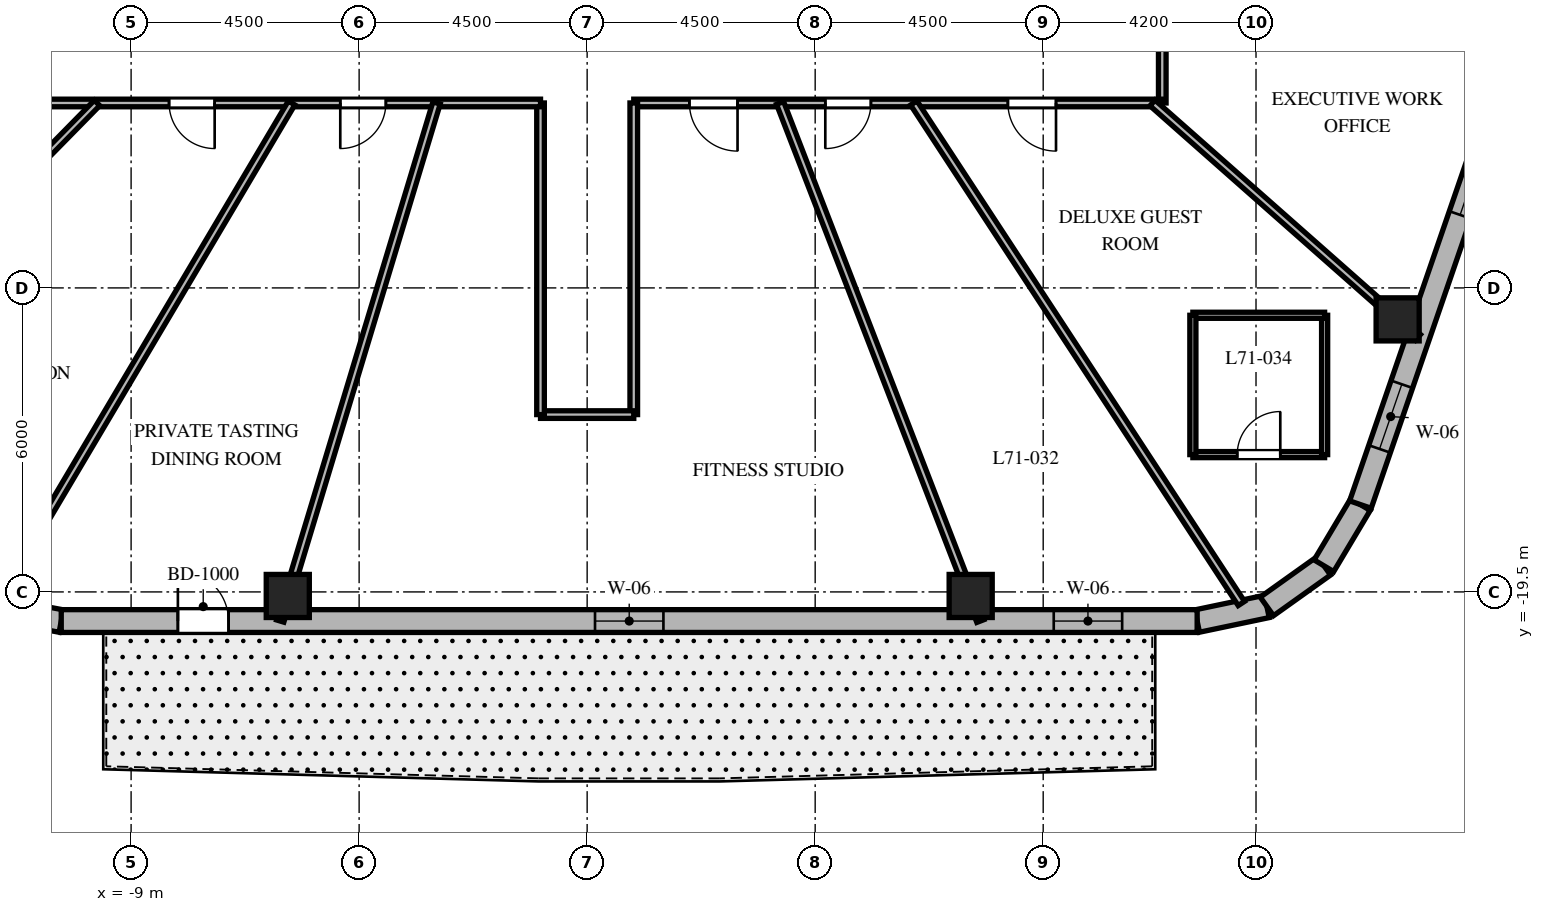
"""IFC4 building model, lengths in metres.
Left out: names, types, materials, properties, quantities, classifications, styles, units other than length and angle.
Written with IfcOpenShell. Run it as: python <this file> out.ifc"""

import sys

from ifc_helpers import new_model, si_unit, direction, frame, frame_2d, origin, origin_2d, place, context, subcontext, project, spatial, rectangle, extrude, element, fill, save


model = new_model("IFC4")
c1 = context("Model", 3, precision=1e-05, world=origin(), true_north=direction((0.0, 1.0)))
c2 = subcontext(c1, "Body", "Model", "MODEL_VIEW")
j1 = project(units=[si_unit("LENGTHUNIT", "METRE"), si_unit("PLANEANGLEUNIT", "RADIAN")], contexts=[c1])
p1 = place(None, origin())
s1 = spatial("IfcSite", under=j1, at=p1, CompositionType="ELEMENT")
p2 = place(p1, origin())
s2 = spatial("IfcBuilding", under=s1, at=p2, CompositionType="ELEMENT")
p3 = place(p2, frame((0.0, 0.0, 284.7)))
s3 = spatial("IfcBuildingStorey", under=s2, at=p3, CompositionType="ELEMENT", Elevation=284.7)
for number, where, z_axis, x_axis in (
    (1, (-5.908, -19.58, 0.0), (0.0, 0.0, 1.0), (1.0, 0.0, 0.0)),
    (2, (7.569, -19.58, 0.0), (0.0, 0.0, 1.0), (1.0, 0.0, 0.0)),
    (3, (15.995, -14.121, 0.0), (0.0, 0.0, 1.0), (1.0, 0.0, 0.0)),
):
    element("IfcColumn", number, at=place(p3, frame(where, z_axis=z_axis, x_axis=x_axis)), inside=s3, PredefinedType="COLUMN", context=c2, shape_type="SweptSolid", body=[
        extrude(rectangle(XDim=0.85, YDim=0.85, at=origin_2d()), origin(), (0.0, 0.0, 1.0), 3.9),
    ])
p4 = place(p3, frame((-11.626, -19.84, 0.0), z_axis=(0.0, 0.0, 1.0), x_axis=(0.982701956681, -0.185194126083, 0.0)))
e4 = element("IfcWall", 4, at=p4, inside=s3, PredefinedType="SOLIDWALL", context=c2, shape_type="SweptSolid", body=[
    extrude(rectangle(XDim=1.27, YDim=0.45, at=frame_2d((0.635, 0.0))), origin(), (0.0, 0.0, 1.0), 3.58),
])
p5 = place(p3, frame((12.038, -20.075, 0.0), z_axis=(0.0, 0.0, 1.0), x_axis=(0.978750122553, 0.205056571711, 0.0)))
e5 = element("IfcWall", 5, at=p5, inside=s3, PredefinedType="SOLIDWALL", context=c2, shape_type="SweptSolid", body=[
    extrude(rectangle(XDim=1.406, YDim=0.45, at=frame_2d((0.703, 0.0))), origin(), (0.0, 0.0, 1.0), 3.58),
])
p6 = place(p3, frame((13.415, -19.787, 0.0), z_axis=(0.0, 0.0, 1.0), x_axis=(0.814055493997, 0.580787097561, 0.0)))
e6 = element("IfcWall", 6, at=p6, inside=s3, PredefinedType="SOLIDWALL", context=c2, shape_type="SweptSolid", body=[
    extrude(rectangle(XDim=1.383, YDim=0.45, at=frame_2d((0.691, 0.0))), origin(), (0.0, 0.0, 1.0), 3.58),
])
p7 = place(p3, frame((14.54, -18.984, 0.0), z_axis=(0.0, 0.0, 1.0), x_axis=(0.512374906623, 0.858761873317, 0.0)))
e7 = element("IfcWall", 7, at=p7, inside=s3, PredefinedType="SOLIDWALL", context=c2, shape_type="SweptSolid", body=[
    extrude(rectangle(XDim=1.406, YDim=0.45, at=frame_2d((0.703, 0.0))), origin(), (0.0, 0.0, 1.0), 3.58),
])
p8 = place(p3, frame((-10.379, -20.075, 0.0), z_axis=(0.0, 0.0, 1.0), x_axis=(1.0, 0.0, 0.0)))
e8 = element("IfcWall", 8, at=p8, inside=s3, PredefinedType="SOLIDWALL", context=c2, shape_type="SweptSolid", body=[
    extrude(rectangle(XDim=22.417, YDim=0.45, at=frame_2d((11.208, 0.0))), origin(), (0.0, 0.0, 1.0), 3.58),
])
p9 = place(p8, frame((2.302, 0.0, 0.0)))
e9 = element("IfcOpeningElement", 9, at=p9, cuts=e8, PredefinedType="OPENING", context=c2, shape_type="SweptSolid", body=[
    extrude(rectangle(XDim=1.0, YDim=2.15, at=frame_2d((0.5, 1.075))), frame((0.0, 0.235, 0.0), z_axis=(0.0, -1.0, 0.0), x_axis=(1.0, 0.0, 0.0)), (0.0, 0.0, 1.0), 0.47),
])
p10 = place(p8, frame((10.534, 0.0, 0.8)))
e10 = element("IfcOpeningElement", 10, at=p10, cuts=e8, PredefinedType="OPENING", context=c2, shape_type="SweptSolid", body=[
    extrude(rectangle(XDim=1.35, YDim=1.75, at=frame_2d((0.675, 0.875))), frame((0.0, 0.235, 0.0), z_axis=(0.0, -1.0, 0.0), x_axis=(1.0, 0.0, 0.0)), (0.0, 0.0, 1.0), 0.47),
])
p11 = place(p8, frame((19.587, 0.0, 0.8)))
e11 = element("IfcOpeningElement", 11, at=p11, cuts=e8, PredefinedType="OPENING", context=c2, shape_type="SweptSolid", body=[
    extrude(rectangle(XDim=1.35, YDim=1.75, at=frame_2d((0.675, 0.875))), frame((0.0, 0.235, 0.0), z_axis=(0.0, -1.0, 0.0), x_axis=(1.0, 0.0, 0.0)), (0.0, 0.0, 1.0), 0.47),
])
p12 = place(p3, frame((15.26, -17.776, 0.0), z_axis=(0.0, 0.0, 1.0), x_axis=(0.325407437101, 0.945573899745, 0.0)))
e12 = element("IfcWall", 12, at=p12, inside=s3, PredefinedType="SOLIDWALL", context=c2, shape_type="SweptSolid", body=[
    extrude(rectangle(XDim=18.552, YDim=0.45, at=frame_2d((9.276, 0.0))), origin(), (0.0, 0.0, 1.0), 3.58),
])
p13 = place(p12, frame((1.161, 0.0, 0.8)))
e13 = element("IfcOpeningElement", 13, at=p13, cuts=e12, PredefinedType="OPENING", context=c2, shape_type="SweptSolid", body=[
    extrude(rectangle(XDim=1.35, YDim=1.75, at=frame_2d((0.675, 0.875))), frame((0.0, 0.235, 0.0), z_axis=(0.0, -1.0, 0.0), x_axis=(1.0, 0.0, 0.0)), (0.0, 0.0, 1.0), 0.47),
])
p14 = place(p12, frame((6.046, 0.0, 0.8)))
e14 = element("IfcOpeningElement", 14, at=p14, cuts=e12, PredefinedType="OPENING", context=c2, shape_type="SweptSolid", body=[
    extrude(rectangle(XDim=1.35, YDim=1.75, at=frame_2d((0.675, 0.875))), frame((0.0, 0.235, 0.0), z_axis=(0.0, -1.0, 0.0), x_axis=(1.0, 0.0, 0.0)), (0.0, 0.0, 1.0), 0.47),
])
p15 = place(p12, frame((11.228, 0.0, 0.8)))
e15 = element("IfcOpeningElement", 15, at=p15, cuts=e12, PredefinedType="OPENING", context=c2, shape_type="SweptSolid", body=[
    extrude(rectangle(XDim=1.35, YDim=1.75, at=frame_2d((0.675, 0.875))), frame((0.0, 0.235, 0.0), z_axis=(0.0, -1.0, 0.0), x_axis=(1.0, 0.0, 0.0)), (0.0, 0.0, 1.0), 0.47),
])
p16 = place(p12, frame((15.987, 0.0, 0.8)))
e16 = element("IfcOpeningElement", 16, at=p16, cuts=e12, PredefinedType="OPENING", context=c2, shape_type="SweptSolid", body=[
    extrude(rectangle(XDim=1.35, YDim=1.75, at=frame_2d((0.675, 0.875))), frame((0.0, 0.235, 0.0), z_axis=(0.0, -1.0, 0.0), x_axis=(1.0, 0.0, 0.0)), (0.0, 0.0, 1.0), 0.47),
])
p17 = place(p3, frame((11.35, -4.4, 0.0), z_axis=(0.0, 0.0, 1.0), x_axis=(0.0, -1.0, 0.0)))
e17 = element("IfcWall", 17, at=p17, inside=s3, PredefinedType="PARTITIONING", context=c2, shape_type="SweptSolid", body=[
    extrude(rectangle(XDim=5.45, YDim=0.15, at=frame_2d((2.725, 0.0))), origin(), (0.0, 0.0, 1.0), 3.07),
])
p18 = place(p17, frame((2.708, 0.0, 0.0)))
e18 = element("IfcOpeningElement", 18, at=p18, cuts=e17, PredefinedType="OPENING", context=c2, shape_type="SweptSolid", body=[
    extrude(rectangle(XDim=0.9, YDim=2.03, at=frame_2d((0.45, 1.015))), frame((0.0, 0.085, 0.0), z_axis=(0.0, -1.0, 0.0), x_axis=(1.0, 0.0, 0.0)), (0.0, 0.0, 1.0), 0.17),
])
p19 = place(p3, frame((11.35, -9.85, 0.0), z_axis=(0.0, 0.0, 1.0), x_axis=(-1.0, 0.0, 0.0)))
e19 = element("IfcWall", 19, at=p19, inside=s3, PredefinedType="PARTITIONING", context=c2, shape_type="SweptSolid", body=[
    extrude(rectangle(XDim=10.43, YDim=0.15, at=frame_2d((5.215, 0.0))), origin(), (0.0, 0.0, 1.0), 3.07),
])
p20 = place(p19, frame((8.382, 0.0, 0.0)))
e20 = element("IfcOpeningElement", 20, at=p20, cuts=e19, PredefinedType="OPENING", context=c2, shape_type="SweptSolid", body=[
    extrude(rectangle(XDim=0.95, YDim=2.03, at=frame_2d((0.475, 1.015))), frame((0.0, 0.085, 0.0), z_axis=(0.0, -1.0, 0.0), x_axis=(1.0, 0.0, 0.0)), (0.0, 0.0, 1.0), 0.17),
])
p21 = place(p19, frame((5.75, 0.0, 0.0)))
e21 = element("IfcOpeningElement", 21, at=p21, cuts=e19, PredefinedType="OPENING", context=c2, shape_type="SweptSolid", body=[
    extrude(rectangle(XDim=0.9, YDim=2.03, at=frame_2d((0.45, 1.015))), frame((0.0, 0.085, 0.0), z_axis=(0.0, -1.0, 0.0), x_axis=(1.0, 0.0, 0.0)), (0.0, 0.0, 1.0), 0.17),
])
p22 = place(p19, frame((2.097, 0.0, 0.0)))
e22 = element("IfcOpeningElement", 22, at=p22, cuts=e19, PredefinedType="OPENING", context=c2, shape_type="SweptSolid", body=[
    extrude(rectangle(XDim=0.95, YDim=2.03, at=frame_2d((0.475, 1.015))), frame((0.0, 0.085, 0.0), z_axis=(0.0, -1.0, 0.0), x_axis=(1.0, 0.0, 0.0)), (0.0, 0.0, 1.0), 0.17),
])
p23 = place(p3, frame((0.92, -9.85, 0.0), z_axis=(0.0, 0.0, 1.0), x_axis=(0.0, -1.0, 0.0)))
e23 = element("IfcWall", 23, at=p23, inside=s3, PredefinedType="PARTITIONING", context=c2, shape_type="SweptSolid", body=[
    extrude(rectangle(XDim=6.15, YDim=0.15, at=frame_2d((3.075, 0.0))), origin(), (0.0, 0.0, 1.0), 3.021),
])
p24 = place(p3, frame((0.92, -16.0, 0.0), z_axis=(0.0, 0.0, 1.0), x_axis=(-1.0, 0.0, 0.0)))
e24 = element("IfcWall", 24, at=p24, inside=s3, PredefinedType="PARTITIONING", context=c2, shape_type="SweptSolid", body=[
    extrude(rectangle(XDim=1.84, YDim=0.15, at=frame_2d((0.92, 0.0))), origin(), (0.0, 0.0, 1.0), 3.58),
])
p25 = place(p3, frame((-0.92, -16.0, 0.0), z_axis=(0.0, 0.0, 1.0), x_axis=(0.0, 1.0, 0.0)))
e25 = element("IfcWall", 25, at=p25, inside=s3, PredefinedType="PARTITIONING", context=c2, shape_type="SweptSolid", body=[
    extrude(rectangle(XDim=6.15, YDim=0.15, at=frame_2d((3.075, 0.0))), origin(), (0.0, 0.0, 1.0), 3.021),
])
p26 = place(p3, frame((-0.92, -9.85, 0.0), z_axis=(0.0, 0.0, 1.0), x_axis=(-1.0, 0.0, 0.0)))
e26 = element("IfcWall", 26, at=p26, inside=s3, PredefinedType="PARTITIONING", context=c2, shape_type="SweptSolid", body=[
    extrude(rectangle(XDim=10.43, YDim=0.15, at=frame_2d((5.215, 0.0))), origin(), (0.0, 0.0, 1.0), 3.07),
])
p27 = place(p26, frame((6.431, 0.0, 0.0)))
e27 = element("IfcOpeningElement", 27, at=p27, cuts=e26, PredefinedType="OPENING", context=c2, shape_type="SweptSolid", body=[
    extrude(rectangle(XDim=0.9, YDim=2.03, at=frame_2d((0.45, 1.015))), frame((0.0, 0.085, 0.0), z_axis=(0.0, -1.0, 0.0), x_axis=(1.0, 0.0, 0.0)), (0.0, 0.0, 1.0), 0.17),
])
p28 = place(p26, frame((3.052, 0.0, 0.0)))
e28 = element("IfcOpeningElement", 28, at=p28, cuts=e26, PredefinedType="OPENING", context=c2, shape_type="SweptSolid", body=[
    extrude(rectangle(XDim=0.9, YDim=2.03, at=frame_2d((0.45, 1.015))), frame((0.0, 0.085, 0.0), z_axis=(0.0, -1.0, 0.0), x_axis=(1.0, 0.0, 0.0)), (0.0, 0.0, 1.0), 0.17),
])
p29 = place(p3, frame((-9.672, -9.85, 0.0), z_axis=(0.0, 0.0, 1.0), x_axis=(-0.700629771301, -0.713524998558, 0.0)))
e29 = element("IfcWall", 29, at=p29, inside=s3, PredefinedType="PARTITIONING", context=c2, shape_type="SweptSolid", body=[
    extrude(rectangle(XDim=7.459, YDim=0.15, at=frame_2d((3.73, 0.0))), origin(), (0.0, 0.0, 1.0), 2.92),
])
p30 = place(p3, frame((-5.833, -9.85, 0.0), z_axis=(0.0, 0.0, 1.0), x_axis=(-0.509561365941, -0.860434317272, 0.0)))
e30 = element("IfcWall", 30, at=p30, inside=s3, PredefinedType="PARTITIONING", context=c2, shape_type="SweptSolid", body=[
    extrude(rectangle(XDim=11.385, YDim=0.15, at=frame_2d((5.692, 0.0))), origin(), (0.0, 0.0, 1.0), 2.92),
])
p31 = place(p3, frame((-2.972, -9.85, 0.0), z_axis=(0.0, 0.0, 1.0), x_axis=(-0.288872169679, -0.957367677324, 0.0)))
e31 = element("IfcWall", 31, at=p31, inside=s3, PredefinedType="PARTITIONING", context=c2, shape_type="SweptSolid", body=[
    extrude(rectangle(XDim=10.68, YDim=0.15, at=frame_2d((5.34, 0.0))), origin(), (0.0, 0.0, 1.0), 2.92),
])
p32 = place(p3, frame((3.808, -9.85, 0.0), z_axis=(0.0, 0.0, 1.0), x_axis=(0.360587327934, -0.932725457427, 0.0)))
e32 = element("IfcWall", 32, at=p32, inside=s3, PredefinedType="PARTITIONING", context=c2, shape_type="SweptSolid", body=[
    extrude(rectangle(XDim=10.962, YDim=0.15, at=frame_2d((5.481, 0.0))), origin(), (0.0, 0.0, 1.0), 2.92),
])
p33 = place(p3, frame((6.446, -9.85, 0.0), z_axis=(0.0, 0.0, 1.0), x_axis=(0.547598105704, -0.836741486141, 0.0)))
e33 = element("IfcWall", 33, at=p33, inside=s3, PredefinedType="PARTITIONING", context=c2, shape_type="SweptSolid", body=[
    extrude(rectangle(XDim=11.806, YDim=0.15, at=frame_2d((5.903, 0.0))), origin(), (0.0, 0.0, 1.0), 2.92),
])
p34 = place(p3, frame((11.157, -9.85, 0.0), z_axis=(0.0, 0.0, 1.0), x_axis=(0.74966962095, -0.661812253909, 0.0)))
e34 = element("IfcWall", 34, at=p34, inside=s3, PredefinedType="PARTITIONING", context=c2, shape_type="SweptSolid", body=[
    extrude(rectangle(XDim=6.989, YDim=0.15, at=frame_2d((3.494, 0.0))), origin(), (0.0, 0.0, 1.0), 2.92),
])
p35 = place(p3, frame((11.35, -5.507, 0.0), z_axis=(0.0, 0.0, 1.0), x_axis=(0.899708724615, -0.436490791256, 0.0)))
e35 = element("IfcWall", 35, at=p35, inside=s3, PredefinedType="PARTITIONING", context=c2, shape_type="SweptSolid", body=[
    extrude(rectangle(XDim=7.746, YDim=0.15, at=frame_2d((3.873, 0.0))), origin(), (0.0, 0.0, 1.0), 2.92),
])
p36 = place(p3, frame((11.954, -16.79, 0.0), z_axis=(0.0, 0.0, 1.0), x_axis=(1.0, 0.0, 0.0)))
e36 = element("IfcWall", 36, at=p36, inside=s3, PredefinedType="PARTITIONING", context=c2, shape_type="SweptSolid", body=[
    extrude(rectangle(XDim=2.6, YDim=0.12, at=frame_2d((1.3, 0.0))), origin(), (0.0, 0.0, 1.0), 2.92),
])
p37 = place(p36, frame((0.875, 0.0, 0.0)))
e37 = element("IfcOpeningElement", 37, at=p37, cuts=e36, PredefinedType="OPENING", context=c2, shape_type="SweptSolid", body=[
    extrude(rectangle(XDim=0.85, YDim=2.03, at=frame_2d((0.425, 1.015))), frame((0.0, 0.07, 0.0), z_axis=(0.0, -1.0, 0.0), x_axis=(1.0, 0.0, 0.0)), (0.0, 0.0, 1.0), 0.14),
])
p38 = place(p3, frame((14.554, -16.79, 0.0), z_axis=(0.0, 0.0, 1.0), x_axis=(0.0, 1.0, 0.0)))
e38 = element("IfcWall", 38, at=p38, inside=s3, PredefinedType="PARTITIONING", context=c2, shape_type="SweptSolid", body=[
    extrude(rectangle(XDim=2.75, YDim=0.12, at=frame_2d((1.375, 0.0))), origin(), (0.0, 0.0, 1.0), 2.92),
])
p39 = place(p3, frame((14.554, -14.04, 0.0), z_axis=(0.0, 0.0, 1.0), x_axis=(-1.0, 0.0, 0.0)))
e39 = element("IfcWall", 39, at=p39, inside=s3, PredefinedType="PARTITIONING", context=c2, shape_type="SweptSolid", body=[
    extrude(rectangle(XDim=2.6, YDim=0.12, at=frame_2d((1.3, 0.0))), origin(), (0.0, 0.0, 1.0), 3.58),
])
p40 = place(p3, frame((11.954, -14.04, 0.0), z_axis=(0.0, 0.0, 1.0), x_axis=(0.0, -1.0, 0.0)))
e40 = element("IfcWall", 40, at=p40, inside=s3, PredefinedType="PARTITIONING", context=c2, shape_type="SweptSolid", body=[
    extrude(rectangle(XDim=2.75, YDim=0.12, at=frame_2d((1.375, 0.0))), origin(), (0.0, 0.0, 1.0), 2.92),
])
p41 = place(p9, origin())
e41 = element("IfcDoor", 41, at=p41, inside=s3, OperationType="SINGLE_SWING_LEFT", PredefinedType="DOOR", context=c2, shape_type="SweptSolid", body=[
    extrude(rectangle(XDim=1.0, YDim=2.15, at=frame_2d((0.5, 1.075))), frame((0.0, 0.025, 0.0), z_axis=(0.0, -1.0, 0.0), x_axis=(1.0, 0.0, 0.0)), (0.0, 0.0, 1.0), 0.05),
])
fill(e9, e41)
p42 = place(p10, origin())
e42 = element("IfcWindow", 42, at=p42, inside=s3, PartitioningType="SINGLE_PANEL", PredefinedType="WINDOW", context=c2, shape_type="SweptSolid", body=[
    extrude(rectangle(XDim=1.35, YDim=1.75, at=frame_2d((0.675, 0.875))), frame((0.0, 0.03, 0.0), z_axis=(0.0, -1.0, 0.0), x_axis=(1.0, 0.0, 0.0)), (0.0, 0.0, 1.0), 0.06),
])
fill(e10, e42)
p43 = place(p11, origin())
e43 = element("IfcWindow", 43, at=p43, inside=s3, PartitioningType="SINGLE_PANEL", PredefinedType="WINDOW", context=c2, shape_type="SweptSolid", body=[
    extrude(rectangle(XDim=1.35, YDim=1.75, at=frame_2d((0.675, 0.875))), frame((0.0, 0.03, 0.0), z_axis=(0.0, -1.0, 0.0), x_axis=(1.0, 0.0, 0.0)), (0.0, 0.0, 1.0), 0.06),
])
fill(e11, e43)
p44 = place(p13, origin())
e44 = element("IfcWindow", 44, at=p44, inside=s3, PartitioningType="SINGLE_PANEL", PredefinedType="WINDOW", context=c2, shape_type="SweptSolid", body=[
    extrude(rectangle(XDim=1.35, YDim=1.75, at=frame_2d((0.675, 0.875))), frame((0.0, 0.03, 0.0), z_axis=(0.0, -1.0, 0.0), x_axis=(1.0, 0.0, 0.0)), (0.0, 0.0, 1.0), 0.06),
])
fill(e13, e44)
p45 = place(p14, origin())
e45 = element("IfcWindow", 45, at=p45, inside=s3, PartitioningType="SINGLE_PANEL", PredefinedType="WINDOW", context=c2, shape_type="SweptSolid", body=[
    extrude(rectangle(XDim=1.35, YDim=1.75, at=frame_2d((0.675, 0.875))), frame((0.0, 0.03, 0.0), z_axis=(0.0, -1.0, 0.0), x_axis=(1.0, 0.0, 0.0)), (0.0, 0.0, 1.0), 0.06),
])
fill(e14, e45)
p46 = place(p27, origin())
e46 = element("IfcDoor", 46, at=p46, inside=s3, OperationType="SINGLE_SWING_LEFT", PredefinedType="DOOR", context=c2, shape_type="SweptSolid", body=[
    extrude(rectangle(XDim=0.9, YDim=2.03, at=frame_2d((0.45, 1.015))), frame((0.0, 0.025, 0.0), z_axis=(0.0, -1.0, 0.0), x_axis=(1.0, 0.0, 0.0)), (0.0, 0.0, 1.0), 0.05),
])
fill(e27, e46)
p47 = place(p28, origin())
e47 = element("IfcDoor", 47, at=p47, inside=s3, OperationType="SINGLE_SWING_RIGHT", PredefinedType="DOOR", context=c2, shape_type="SweptSolid", body=[
    extrude(rectangle(XDim=0.9, YDim=2.03, at=frame_2d((0.45, 1.015))), frame((0.0, 0.025, 0.0), z_axis=(0.0, -1.0, 0.0), x_axis=(1.0, 0.0, 0.0)), (0.0, 0.0, 1.0), 0.05),
])
fill(e28, e47)
p48 = place(p20, origin())
e48 = element("IfcDoor", 48, at=p48, inside=s3, OperationType="SINGLE_SWING_LEFT", PredefinedType="DOOR", context=c2, shape_type="SweptSolid", body=[
    extrude(rectangle(XDim=0.95, YDim=2.03, at=frame_2d((0.475, 1.015))), frame((0.0, 0.025, 0.0), z_axis=(0.0, -1.0, 0.0), x_axis=(1.0, 0.0, 0.0)), (0.0, 0.0, 1.0), 0.05),
])
fill(e20, e48)
p49 = place(p21, origin())
e49 = element("IfcDoor", 49, at=p49, inside=s3, OperationType="SINGLE_SWING_RIGHT", PredefinedType="DOOR", context=c2, shape_type="SweptSolid", body=[
    extrude(rectangle(XDim=0.9, YDim=2.03, at=frame_2d((0.45, 1.015))), frame((0.0, 0.025, 0.0), z_axis=(0.0, -1.0, 0.0), x_axis=(1.0, 0.0, 0.0)), (0.0, 0.0, 1.0), 0.05),
])
fill(e21, e49)
p50 = place(p22, origin())
e50 = element("IfcDoor", 50, at=p50, inside=s3, OperationType="SINGLE_SWING_LEFT", PredefinedType="DOOR", context=c2, shape_type="SweptSolid", body=[
    extrude(rectangle(XDim=0.95, YDim=2.03, at=frame_2d((0.475, 1.015))), frame((0.0, 0.025, 0.0), z_axis=(0.0, -1.0, 0.0), x_axis=(1.0, 0.0, 0.0)), (0.0, 0.0, 1.0), 0.05),
])
fill(e22, e50)
p51 = place(p37, origin())
e51 = element("IfcDoor", 51, at=p51, inside=s3, OperationType="SINGLE_SWING_RIGHT", PredefinedType="DOOR", context=c2, shape_type="SweptSolid", body=[
    extrude(rectangle(XDim=0.85, YDim=2.03, at=frame_2d((0.425, 1.015))), frame((0.0, 0.025, 0.0), z_axis=(0.0, -1.0, 0.0), x_axis=(1.0, 0.0, 0.0)), (0.0, 0.0, 1.0), 0.05),
])
fill(e37, e51)
save(model, sys.argv[1])
